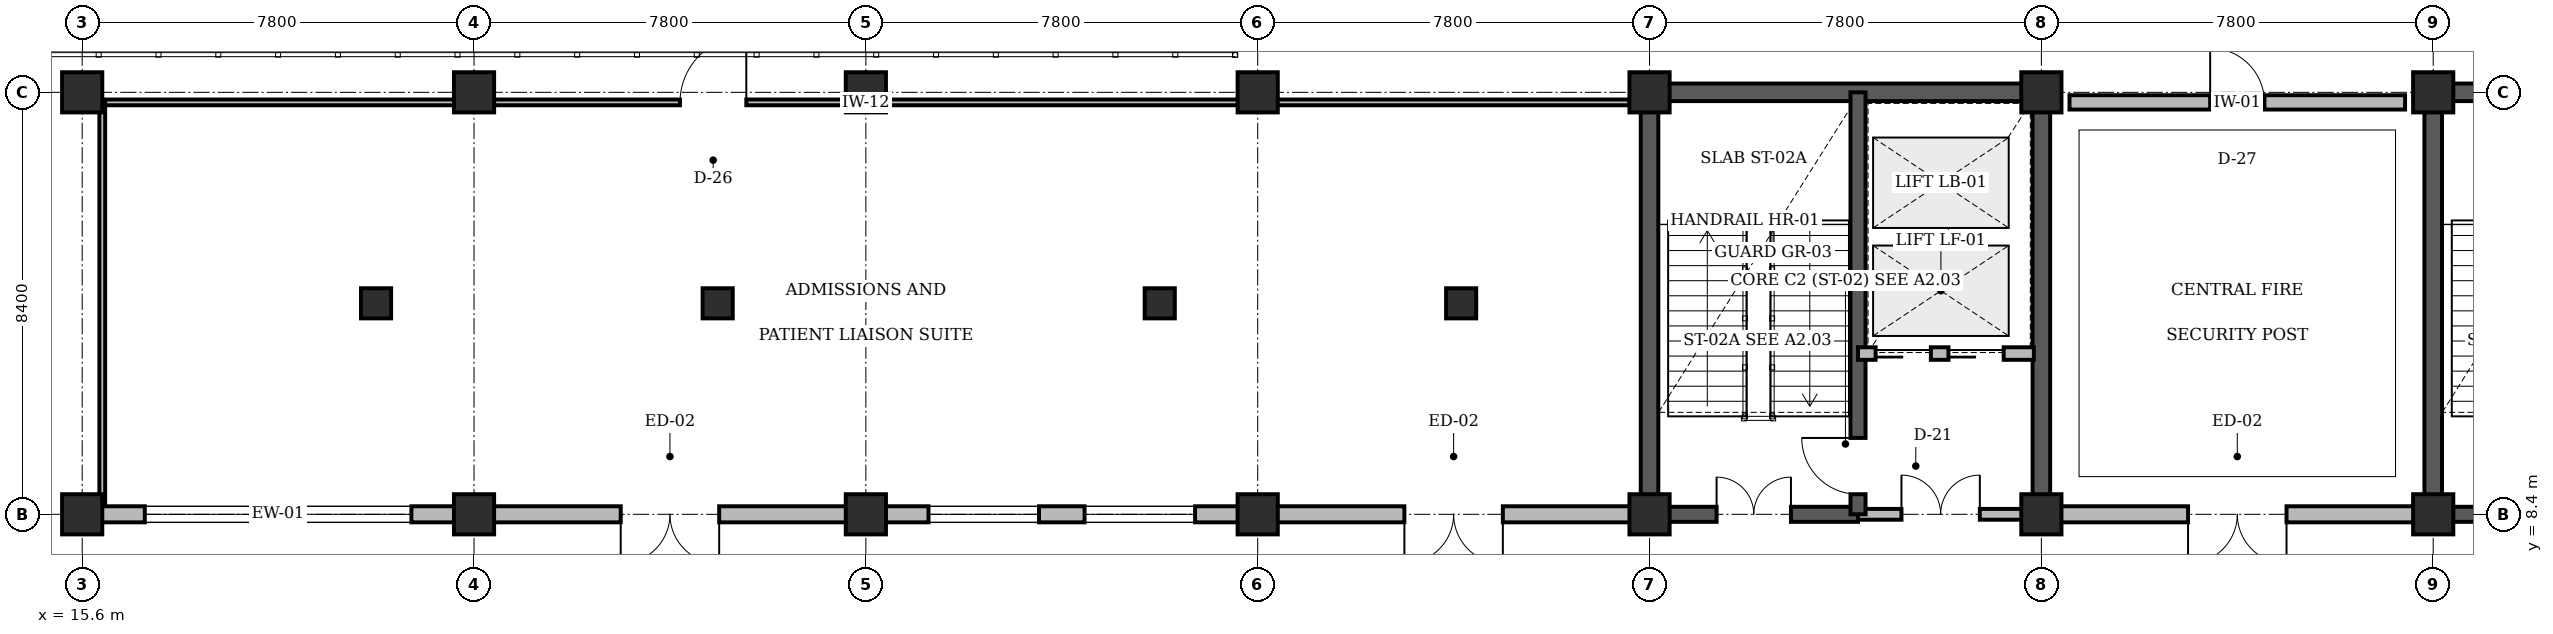
"""IFC4 building model, lengths in metres.
Left out: names, types, materials, properties, quantities, classifications, styles, units other than length and angle.
Written with IfcOpenShell. Run it as: python <this file> out.ifc"""

import sys

from ifc_helpers import new_model, si_unit, direction, frame, frame_2d, origin, origin_2d, place, context, subcontext, project, spatial, rectangle, circle, extrude, element, fill, save


model = new_model("IFC4")
c1 = context("Model", 3, precision=1e-05, world=origin(), true_north=direction((0.0, 1.0)))
c2 = subcontext(c1, "Body", "Model", "MODEL_VIEW")
j1 = project(units=[si_unit("LENGTHUNIT", "METRE"), si_unit("PLANEANGLEUNIT", "RADIAN")], contexts=[c1])
p1 = place(None, origin())
s1 = spatial("IfcSite", under=j1, at=p1, CompositionType="ELEMENT")
p2 = place(p1, origin())
s2 = spatial("IfcBuilding", under=s1, at=p2, CompositionType="ELEMENT")
p3 = place(p2, origin())
s3 = spatial("IfcBuildingStorey", under=s2, at=p3, CompositionType="ELEMENT", Elevation=0.0)
p4 = place(p3, frame((46.625, 16.8, 0.0), z_axis=(0.0, 0.0, 1.0), x_axis=(1.0, 0.0, 0.0)))
e1 = element("IfcWall", 1, at=p4, inside=s3, PredefinedType="SHEAR", context=c2, shape_type="SweptSolid", body=[
    extrude(rectangle(XDim=8.15, YDim=0.35, at=frame_2d((4.075, 0.0))), origin(), (0.0, 0.0, 1.0), 4.48),
])
for number, where, z_axis, x_axis in (
    (2, (46.8, 8.4, 0.0), (0.0, 0.0, 1.0), (0.0, 1.0, 0.0)),
    (3, (54.6, 8.4, 0.0), (0.0, 0.0, 1.0), (0.0, 1.0, 0.0)),
):
    element("IfcWall", number, at=place(p3, frame(where, z_axis=z_axis, x_axis=x_axis)), inside=s3, PredefinedType="SHEAR", context=c2, shape_type="SweptSolid", body=[
        extrude(rectangle(XDim=8.4, YDim=0.35, at=frame_2d((4.2, 0.0))), origin(), (0.0, 0.0, 1.0), 4.48),
    ])
p5 = place(p3, frame((62.225, 16.8, 0.0), z_axis=(0.0, 0.0, 1.0), x_axis=(1.0, 0.0, 0.0)))
e4 = element("IfcWall", 4, at=p5, inside=s3, PredefinedType="SHEAR", context=c2, shape_type="SweptSolid", body=[
    extrude(rectangle(XDim=8.15, YDim=0.35, at=frame_2d((4.075, 0.0))), origin(), (0.0, 0.0, 1.0), 4.48),
])
p6 = place(p3, frame((62.4, 8.4, 0.0), z_axis=(0.0, 0.0, 1.0), x_axis=(0.0, 1.0, 0.0)))
e5 = element("IfcWall", 5, at=p6, inside=s3, PredefinedType="SHEAR", context=c2, shape_type="SweptSolid", body=[
    extrude(rectangle(XDim=8.4, YDim=0.35, at=frame_2d((4.2, 0.0))), origin(), (0.0, 0.0, 1.0), 4.48),
])
for number, where, z_axis, x_axis in (
    (6, (15.6, 8.4, 0.0), (0.0, 0.0, 1.0), (1.0, 0.0, 0.0)),
    (7, (15.6, 16.8, 0.0), (0.0, 0.0, 1.0), (1.0, 0.0, 0.0)),
    (8, (23.4, 8.4, 0.0), (0.0, 0.0, 1.0), (1.0, 0.0, 0.0)),
    (9, (23.4, 16.8, 0.0), (0.0, 0.0, 1.0), (1.0, 0.0, 0.0)),
    (10, (31.2, 8.4, 0.0), (0.0, 0.0, 1.0), (1.0, 0.0, 0.0)),
    (11, (31.2, 16.8, 0.0), (0.0, 0.0, 1.0), (1.0, 0.0, 0.0)),
    (12, (39.0, 8.4, 0.0), (0.0, 0.0, 1.0), (1.0, 0.0, 0.0)),
    (13, (39.0, 16.8, 0.0), (0.0, 0.0, 1.0), (1.0, 0.0, 0.0)),
    (14, (46.8, 8.4, 0.0), (0.0, 0.0, 1.0), (1.0, 0.0, 0.0)),
    (15, (46.8, 16.8, 0.0), (0.0, 0.0, 1.0), (1.0, 0.0, 0.0)),
    (16, (54.6, 8.4, 0.0), (0.0, 0.0, 1.0), (1.0, 0.0, 0.0)),
    (17, (54.6, 16.8, 0.0), (0.0, 0.0, 1.0), (1.0, 0.0, 0.0)),
    (18, (62.4, 8.4, 0.0), (0.0, 0.0, 1.0), (1.0, 0.0, 0.0)),
    (19, (62.4, 16.8, 0.0), (0.0, 0.0, 1.0), (1.0, 0.0, 0.0)),
):
    element("IfcColumn", number, at=place(p3, frame(where, z_axis=z_axis, x_axis=x_axis)), inside=s3, PredefinedType="COLUMN", context=c2, shape_type="SweptSolid", body=[
        extrude(rectangle(XDim=0.8, YDim=0.8, at=origin_2d()), origin(), (0.0, 0.0, 1.0), 4.8),
    ])
for number, where, z_axis, x_axis in (
    (20, (21.45, 12.6, 0.0), (0.0, 0.0, 1.0), (1.0, 0.0, 0.0)),
    (21, (28.25, 12.6, 0.0), (0.0, 0.0, 1.0), (1.0, 0.0, 0.0)),
    (22, (37.05, 12.6, 0.0), (0.0, 0.0, 1.0), (1.0, 0.0, 0.0)),
    (23, (43.05, 12.6, 0.0), (0.0, 0.0, 1.0), (1.0, 0.0, 0.0)),
):
    element("IfcColumn", number, at=place(p3, frame(where, z_axis=z_axis, x_axis=x_axis)), inside=s3, PredefinedType="PILASTER", context=c2, shape_type="SweptSolid", body=[
        extrude(circle(Radius=0.3, at=origin_2d()), origin(), (0.0, 0.0, 1.0), 4.8),
    ])
p7 = place(p3, frame((23.06, 8.4, 0.0), z_axis=(0.0, 0.0, 1.0), x_axis=(-1.0, 0.0, 0.0)))
e24 = element("IfcWall", 24, at=p7, inside=s3, PredefinedType="STANDARD", context=c2, shape_type="SweptSolid", body=[
    extrude(rectangle(XDim=7.12, YDim=0.32, at=frame_2d((3.56, 0.0))), origin(), (0.0, 0.0, 1.0), 3.63),
])
p8 = place(p7, frame((0.907, 0.0, 0.9)))
e25 = element("IfcOpeningElement", 25, at=p8, cuts=e24, PredefinedType="OPENING", context=c2, shape_type="SweptSolid", body=[
    extrude(rectangle(XDim=2.2, YDim=1.65, at=frame_2d((1.1, 0.825))), frame((0.0, 0.17, 0.0), z_axis=(0.0, -1.0, 0.0), x_axis=(1.0, 0.0, 0.0)), (0.0, 0.0, 1.0), 0.34),
])
p9 = place(p7, frame((4.013, 0.0, 0.9)))
e26 = element("IfcOpeningElement", 26, at=p9, cuts=e24, PredefinedType="OPENING", context=c2, shape_type="SweptSolid", body=[
    extrude(rectangle(XDim=2.2, YDim=1.65, at=frame_2d((1.1, 0.825))), frame((0.0, 0.17, 0.0), z_axis=(0.0, -1.0, 0.0), x_axis=(1.0, 0.0, 0.0)), (0.0, 0.0, 1.0), 0.34),
])
p10 = place(p3, frame((30.86, 8.4, 0.0), z_axis=(0.0, 0.0, 1.0), x_axis=(-1.0, 0.0, 0.0)))
e27 = element("IfcWall", 27, at=p10, inside=s3, PredefinedType="STANDARD", context=c2, shape_type="SweptSolid", body=[
    extrude(rectangle(XDim=7.12, YDim=0.32, at=frame_2d((3.56, 0.0))), origin(), (0.0, 0.0, 1.0), 3.63),
])
p11 = place(p10, frame((2.58, 0.0, 0.0)))
e28 = element("IfcOpeningElement", 28, at=p11, cuts=e27, PredefinedType="OPENING", context=c2, shape_type="SweptSolid", body=[
    extrude(rectangle(XDim=1.96, YDim=2.2, at=frame_2d((0.98, 1.1))), frame((0.0, 0.17, 0.0), z_axis=(0.0, -1.0, 0.0), x_axis=(1.0, 0.0, 0.0)), (0.0, 0.0, 1.0), 0.34),
])
p12 = place(p3, frame((38.66, 8.4, 0.0), z_axis=(0.0, 0.0, 1.0), x_axis=(-1.0, 0.0, 0.0)))
e29 = element("IfcWall", 29, at=p12, inside=s3, PredefinedType="STANDARD", context=c2, shape_type="SweptSolid", body=[
    extrude(rectangle(XDim=7.12, YDim=0.32, at=frame_2d((3.56, 0.0))), origin(), (0.0, 0.0, 1.0), 3.63),
])
p13 = place(p12, frame((0.907, 0.0, 0.9)))
e30 = element("IfcOpeningElement", 30, at=p13, cuts=e29, PredefinedType="OPENING", context=c2, shape_type="SweptSolid", body=[
    extrude(rectangle(XDim=2.2, YDim=1.65, at=frame_2d((1.1, 0.825))), frame((0.0, 0.17, 0.0), z_axis=(0.0, -1.0, 0.0), x_axis=(1.0, 0.0, 0.0)), (0.0, 0.0, 1.0), 0.34),
])
p14 = place(p12, frame((4.013, 0.0, 0.9)))
e31 = element("IfcOpeningElement", 31, at=p14, cuts=e29, PredefinedType="OPENING", context=c2, shape_type="SweptSolid", body=[
    extrude(rectangle(XDim=2.2, YDim=1.65, at=frame_2d((1.1, 0.825))), frame((0.0, 0.17, 0.0), z_axis=(0.0, -1.0, 0.0), x_axis=(1.0, 0.0, 0.0)), (0.0, 0.0, 1.0), 0.34),
])
p15 = place(p3, frame((46.46, 8.4, 0.0), z_axis=(0.0, 0.0, 1.0), x_axis=(-1.0, 0.0, 0.0)))
e32 = element("IfcWall", 32, at=p15, inside=s3, PredefinedType="STANDARD", context=c2, shape_type="SweptSolid", body=[
    extrude(rectangle(XDim=7.12, YDim=0.32, at=frame_2d((3.56, 0.0))), origin(), (0.0, 0.0, 1.0), 3.63),
])
p16 = place(p15, frame((2.58, 0.0, 0.0)))
e33 = element("IfcOpeningElement", 33, at=p16, cuts=e32, PredefinedType="OPENING", context=c2, shape_type="SweptSolid", body=[
    extrude(rectangle(XDim=1.96, YDim=2.2, at=frame_2d((0.98, 1.1))), frame((0.0, 0.17, 0.0), z_axis=(0.0, -1.0, 0.0), x_axis=(1.0, 0.0, 0.0)), (0.0, 0.0, 1.0), 0.34),
])
p17 = place(p3, frame((62.06, 8.4, 0.0), z_axis=(0.0, 0.0, 1.0), x_axis=(-1.0, 0.0, 0.0)))
e34 = element("IfcWall", 34, at=p17, inside=s3, PredefinedType="STANDARD", context=c2, shape_type="SweptSolid", body=[
    extrude(rectangle(XDim=7.12, YDim=0.32, at=frame_2d((3.56, 0.0))), origin(), (0.0, 0.0, 1.0), 3.63),
])
p18 = place(p17, frame((2.58, 0.0, 0.0)))
e35 = element("IfcOpeningElement", 35, at=p18, cuts=e34, PredefinedType="OPENING", context=c2, shape_type="SweptSolid", body=[
    extrude(rectangle(XDim=1.96, YDim=2.2, at=frame_2d((0.98, 1.1))), frame((0.0, 0.17, 0.0), z_axis=(0.0, -1.0, 0.0), x_axis=(1.0, 0.0, 0.0)), (0.0, 0.0, 1.0), 0.34),
])
p19 = place(p3, frame((46.8, 8.4, 0.0), z_axis=(0.0, 0.0, 1.0), x_axis=(1.0, 0.0, 0.0)))
e36 = element("IfcWall", 36, at=p19, inside=s3, PredefinedType="SHEAR", context=c2, shape_type="SweptSolid", body=[
    extrude(rectangle(XDim=4.15, YDim=0.3, at=frame_2d((2.075, 0.0))), origin(), (0.0, 0.0, 1.0), 4.8),
])
p20 = place(p19, frame((1.335, 0.0, 0.0)))
e37 = element("IfcOpeningElement", 37, at=p20, cuts=e36, PredefinedType="OPENING", context=c2, shape_type="SweptSolid", body=[
    extrude(rectangle(XDim=1.48, YDim=2.2, at=frame_2d((0.74, 1.1))), frame((0.0, 0.16, 0.0), z_axis=(0.0, -1.0, 0.0), x_axis=(1.0, 0.0, 0.0)), (0.0, 0.0, 1.0), 0.32),
])
p21 = place(p3, frame((50.95, 8.4, 0.0), z_axis=(0.0, 0.0, 1.0), x_axis=(1.0, 0.0, 0.0)))
e38 = element("IfcWall", 38, at=p21, inside=s3, PredefinedType="STANDARD", context=c2, shape_type="SweptSolid", body=[
    extrude(rectangle(XDim=3.29, YDim=0.215, at=frame_2d((1.645, 0.0))), origin(), (0.0, 0.0, 1.0), 3.63),
])
p22 = place(p21, frame((0.865, 0.0, 0.0)))
e39 = element("IfcOpeningElement", 39, at=p22, cuts=e38, PredefinedType="OPENING", context=c2, shape_type="SweptSolid", body=[
    extrude(rectangle(XDim=1.56, YDim=2.2, at=frame_2d((0.78, 1.1))), frame((0.0, 0.118, 0.0), z_axis=(0.0, -1.0, 0.0), x_axis=(1.0, 0.0, 0.0)), (0.0, 0.0, 1.0), 0.235),
])
p23 = place(p3, frame((50.95, 8.4, 0.0), z_axis=(0.0, 0.0, 1.0), x_axis=(0.0, 1.0, 0.0)))
e40 = element("IfcWall", 40, at=p23, inside=s3, PredefinedType="SHEAR", context=c2, shape_type="SweptSolid", body=[
    extrude(rectangle(XDim=8.4, YDim=0.3, at=frame_2d((4.2, 0.0))), origin(), (0.0, 0.0, 1.0), 4.8),
])
p24 = place(p23, frame((0.4, 0.0, 0.0)))
e41 = element("IfcOpeningElement", 41, at=p24, cuts=e40, PredefinedType="OPENING", context=c2, shape_type="SweptSolid", body=[
    extrude(rectangle(XDim=1.12, YDim=2.15, at=frame_2d((0.56, 1.075))), frame((0.0, 0.16, 0.0), z_axis=(0.0, -1.0, 0.0), x_axis=(1.0, 0.0, 0.0)), (0.0, 0.0, 1.0), 0.32),
])
p25 = place(p3, frame((50.95, 11.6, 0.0), z_axis=(0.0, 0.0, 1.0), x_axis=(1.0, 0.0, 0.0)))
e42 = element("IfcWall", 42, at=p25, inside=s3, PredefinedType="STANDARD", context=c2, shape_type="SweptSolid", body=[
    extrude(rectangle(XDim=3.5, YDim=0.25, at=frame_2d((1.75, 0.0))), origin(), (0.0, 0.0, 1.0), 4.46),
])
p26 = place(p25, frame((0.35, 0.0, 0.0)))
e43 = element("IfcOpeningElement", 43, at=p26, cuts=e42, PredefinedType="OPENING", context=c2, shape_type="SweptSolid", body=[
    extrude(rectangle(XDim=1.1, YDim=2.2, at=frame_2d((0.55, 1.1))), frame((0.0, 0.135, 0.0), z_axis=(0.0, -1.0, 0.0), x_axis=(1.0, 0.0, 0.0)), (0.0, 0.0, 1.0), 0.27),
])
p27 = place(p25, frame((1.8, 0.0, 0.0)))
e44 = element("IfcOpeningElement", 44, at=p27, cuts=e42, PredefinedType="OPENING", context=c2, shape_type="SweptSolid", body=[
    extrude(rectangle(XDim=1.1, YDim=2.2, at=frame_2d((0.55, 1.1))), frame((0.0, 0.135, 0.0), z_axis=(0.0, -1.0, 0.0), x_axis=(1.0, 0.0, 0.0)), (0.0, 0.0, 1.0), 0.27),
])
p28 = place(p3, frame((62.4, 8.4, 0.0), z_axis=(0.0, 0.0, 1.0), x_axis=(1.0, 0.0, 0.0)))
e45 = element("IfcWall", 45, at=p28, inside=s3, PredefinedType="SHEAR", context=c2, shape_type="SweptSolid", body=[
    extrude(rectangle(XDim=4.15, YDim=0.3, at=frame_2d((2.075, 0.0))), origin(), (0.0, 0.0, 1.0), 4.8),
])
p29 = place(p28, frame((1.335, 0.0, 0.0)))
e46 = element("IfcOpeningElement", 46, at=p29, cuts=e45, PredefinedType="OPENING", context=c2, shape_type="SweptSolid", body=[
    extrude(rectangle(XDim=1.48, YDim=2.2, at=frame_2d((0.74, 1.1))), frame((0.0, 0.16, 0.0), z_axis=(0.0, -1.0, 0.0), x_axis=(1.0, 0.0, 0.0)), (0.0, 0.0, 1.0), 0.32),
])
p30 = place(p3, frame((16.0, 16.6, 0.0), z_axis=(0.0, 0.0, 1.0), x_axis=(1.0, 0.0, 0.0)))
e47 = element("IfcWall", 47, at=p30, inside=s3, PredefinedType="PARTITIONING", context=c2, shape_type="SweptSolid", body=[
    extrude(rectangle(XDim=30.4, YDim=0.115, at=frame_2d((15.2, 0.0))), origin(), (0.0, 0.0, 1.0), 3.63),
])
p31 = place(p30, frame((11.5, 0.0, 0.0)))
e48 = element("IfcOpeningElement", 48, at=p31, cuts=e47, PredefinedType="OPENING", context=c2, shape_type="SweptSolid", body=[
    extrude(rectangle(XDim=1.32, YDim=2.15, at=frame_2d((0.66, 1.075))), frame((0.0, 0.067, 0.0), z_axis=(0.0, -1.0, 0.0), x_axis=(1.0, 0.0, 0.0)), (0.0, 0.0, 1.0), 0.135),
])
p32 = place(p3, frame((16.0, 8.6, 0.0), z_axis=(0.0, 0.0, 1.0), x_axis=(0.0, 1.0, 0.0)))
e49 = element("IfcWall", 49, at=p32, inside=s3, PredefinedType="PARTITIONING", context=c2, shape_type="SweptSolid", body=[
    extrude(rectangle(XDim=8.0, YDim=0.115, at=frame_2d((4.0, 0.0))), origin(), (0.0, 0.0, 1.0), 3.63),
])
p33 = place(p3, frame((55.16, 16.6, 0.0), z_axis=(0.0, 0.0, 1.0), x_axis=(1.0, 0.0, 0.0)))
e50 = element("IfcWall", 50, at=p33, inside=s3, PredefinedType="STANDARD", context=c2, shape_type="SweptSolid", body=[
    extrude(rectangle(XDim=6.68, YDim=0.285, at=frame_2d((3.34, 0.0))), origin(), (0.0, 0.0, 1.0), 3.63),
])
p34 = place(p33, frame((2.8, 0.0, 0.0)))
e51 = element("IfcOpeningElement", 51, at=p34, cuts=e50, PredefinedType="OPENING", context=c2, shape_type="SweptSolid", body=[
    extrude(rectangle(XDim=1.08, YDim=2.15, at=frame_2d((0.54, 1.075))), frame((0.0, 0.152, 0.0), z_axis=(0.0, -1.0, 0.0), x_axis=(1.0, 0.0, 0.0)), (0.0, 0.0, 1.0), 0.305),
])
p35 = place(p8, origin())
e52 = element("IfcWindow", 52, at=p35, inside=s3, PartitioningType="SINGLE_PANEL", PredefinedType="WINDOW", context=c2, shape_type="SweptSolid", body=[
    extrude(rectangle(XDim=2.2, YDim=1.65, at=frame_2d((1.1, 0.825))), frame((0.0, 0.03, 0.0), z_axis=(0.0, -1.0, 0.0), x_axis=(1.0, 0.0, 0.0)), (0.0, 0.0, 1.0), 0.06),
])
fill(e25, e52)
p36 = place(p9, origin())
e53 = element("IfcWindow", 53, at=p36, inside=s3, PartitioningType="SINGLE_PANEL", PredefinedType="WINDOW", context=c2, shape_type="SweptSolid", body=[
    extrude(rectangle(XDim=2.2, YDim=1.65, at=frame_2d((1.1, 0.825))), frame((0.0, 0.03, 0.0), z_axis=(0.0, -1.0, 0.0), x_axis=(1.0, 0.0, 0.0)), (0.0, 0.0, 1.0), 0.06),
])
fill(e26, e53)
p37 = place(p11, origin())
e54 = element("IfcDoor", 54, at=p37, inside=s3, OperationType="DOUBLE_DOOR_SINGLE_SWING", PredefinedType="DOOR", context=c2, shape_type="SweptSolid", body=[
    extrude(rectangle(XDim=1.96, YDim=2.2, at=frame_2d((0.98, 1.1))), frame((0.0, 0.025, 0.0), z_axis=(0.0, -1.0, 0.0), x_axis=(1.0, 0.0, 0.0)), (0.0, 0.0, 1.0), 0.05),
])
fill(e28, e54)
p38 = place(p13, origin())
e55 = element("IfcWindow", 55, at=p38, inside=s3, PartitioningType="SINGLE_PANEL", PredefinedType="WINDOW", context=c2, shape_type="SweptSolid", body=[
    extrude(rectangle(XDim=2.2, YDim=1.65, at=frame_2d((1.1, 0.825))), frame((0.0, 0.03, 0.0), z_axis=(0.0, -1.0, 0.0), x_axis=(1.0, 0.0, 0.0)), (0.0, 0.0, 1.0), 0.06),
])
fill(e30, e55)
p39 = place(p14, origin())
e56 = element("IfcWindow", 56, at=p39, inside=s3, PartitioningType="SINGLE_PANEL", PredefinedType="WINDOW", context=c2, shape_type="SweptSolid", body=[
    extrude(rectangle(XDim=2.2, YDim=1.65, at=frame_2d((1.1, 0.825))), frame((0.0, 0.03, 0.0), z_axis=(0.0, -1.0, 0.0), x_axis=(1.0, 0.0, 0.0)), (0.0, 0.0, 1.0), 0.06),
])
fill(e31, e56)
p40 = place(p16, origin())
e57 = element("IfcDoor", 57, at=p40, inside=s3, OperationType="DOUBLE_DOOR_SINGLE_SWING", PredefinedType="DOOR", context=c2, shape_type="SweptSolid", body=[
    extrude(rectangle(XDim=1.96, YDim=2.2, at=frame_2d((0.98, 1.1))), frame((0.0, 0.025, 0.0), z_axis=(0.0, -1.0, 0.0), x_axis=(1.0, 0.0, 0.0)), (0.0, 0.0, 1.0), 0.05),
])
fill(e33, e57)
p41 = place(p18, origin())
e58 = element("IfcDoor", 58, at=p41, inside=s3, OperationType="DOUBLE_DOOR_SINGLE_SWING", PredefinedType="DOOR", context=c2, shape_type="SweptSolid", body=[
    extrude(rectangle(XDim=1.96, YDim=2.2, at=frame_2d((0.98, 1.1))), frame((0.0, 0.025, 0.0), z_axis=(0.0, -1.0, 0.0), x_axis=(1.0, 0.0, 0.0)), (0.0, 0.0, 1.0), 0.05),
])
fill(e35, e58)
p42 = place(p20, origin())
e59 = element("IfcDoor", 59, at=p42, inside=s3, OperationType="DOUBLE_DOOR_SINGLE_SWING", PredefinedType="DOOR", context=c2, shape_type="SweptSolid", body=[
    extrude(rectangle(XDim=1.48, YDim=2.2, at=frame_2d((0.74, 1.1))), frame((0.0, 0.025, 0.0), z_axis=(0.0, -1.0, 0.0), x_axis=(1.0, 0.0, 0.0)), (0.0, 0.0, 1.0), 0.05),
])
fill(e37, e59)
p43 = place(p22, origin())
e60 = element("IfcDoor", 60, at=p43, inside=s3, OperationType="DOUBLE_DOOR_SINGLE_SWING", PredefinedType="DOOR", context=c2, shape_type="SweptSolid", body=[
    extrude(rectangle(XDim=1.56, YDim=2.2, at=frame_2d((0.78, 1.1))), frame((0.0, 0.025, 0.0), z_axis=(0.0, -1.0, 0.0), x_axis=(1.0, 0.0, 0.0)), (0.0, 0.0, 1.0), 0.05),
])
fill(e39, e60)
p44 = place(p24, origin())
e61 = element("IfcDoor", 61, at=p44, inside=s3, OperationType="SINGLE_SWING_RIGHT", PredefinedType="DOOR", context=c2, shape_type="SweptSolid", body=[
    extrude(rectangle(XDim=1.12, YDim=2.15, at=frame_2d((0.56, 1.075))), frame((0.0, 0.025, 0.0), z_axis=(0.0, -1.0, 0.0), x_axis=(1.0, 0.0, 0.0)), (0.0, 0.0, 1.0), 0.05),
])
fill(e41, e61)
p45 = place(p26, origin())
e62 = element("IfcDoor", 62, at=p45, inside=s3, OperationType="SLIDING_TO_LEFT", PredefinedType="DOOR", context=c2, shape_type="SweptSolid", body=[
    extrude(rectangle(XDim=1.1, YDim=2.2, at=frame_2d((0.55, 1.1))), frame((0.0, 0.025, 0.0), z_axis=(0.0, -1.0, 0.0), x_axis=(1.0, 0.0, 0.0)), (0.0, 0.0, 1.0), 0.05),
])
fill(e43, e62)
p46 = place(p27, origin())
e63 = element("IfcDoor", 63, at=p46, inside=s3, OperationType="SLIDING_TO_LEFT", PredefinedType="DOOR", context=c2, shape_type="SweptSolid", body=[
    extrude(rectangle(XDim=1.1, YDim=2.2, at=frame_2d((0.55, 1.1))), frame((0.0, 0.025, 0.0), z_axis=(0.0, -1.0, 0.0), x_axis=(1.0, 0.0, 0.0)), (0.0, 0.0, 1.0), 0.05),
])
fill(e44, e63)
p47 = place(p31, origin())
e64 = element("IfcDoor", 64, at=p47, inside=s3, OperationType="SINGLE_SWING_RIGHT", PredefinedType="DOOR", context=c2, shape_type="SweptSolid", body=[
    extrude(rectangle(XDim=1.32, YDim=2.15, at=frame_2d((0.66, 1.075))), frame((0.0, 0.025, 0.0), z_axis=(0.0, -1.0, 0.0), x_axis=(1.0, 0.0, 0.0)), (0.0, 0.0, 1.0), 0.05),
])
fill(e48, e64)
p48 = place(p34, origin())
e65 = element("IfcDoor", 65, at=p48, inside=s3, OperationType="SINGLE_SWING_LEFT", PredefinedType="DOOR", context=c2, shape_type="SweptSolid", body=[
    extrude(rectangle(XDim=1.08, YDim=2.15, at=frame_2d((0.54, 1.075))), frame((0.0, 0.025, 0.0), z_axis=(0.0, -1.0, 0.0), x_axis=(1.0, 0.0, 0.0)), (0.0, 0.0, 1.0), 0.05),
])
fill(e51, e65)
save(model, sys.argv[1])
